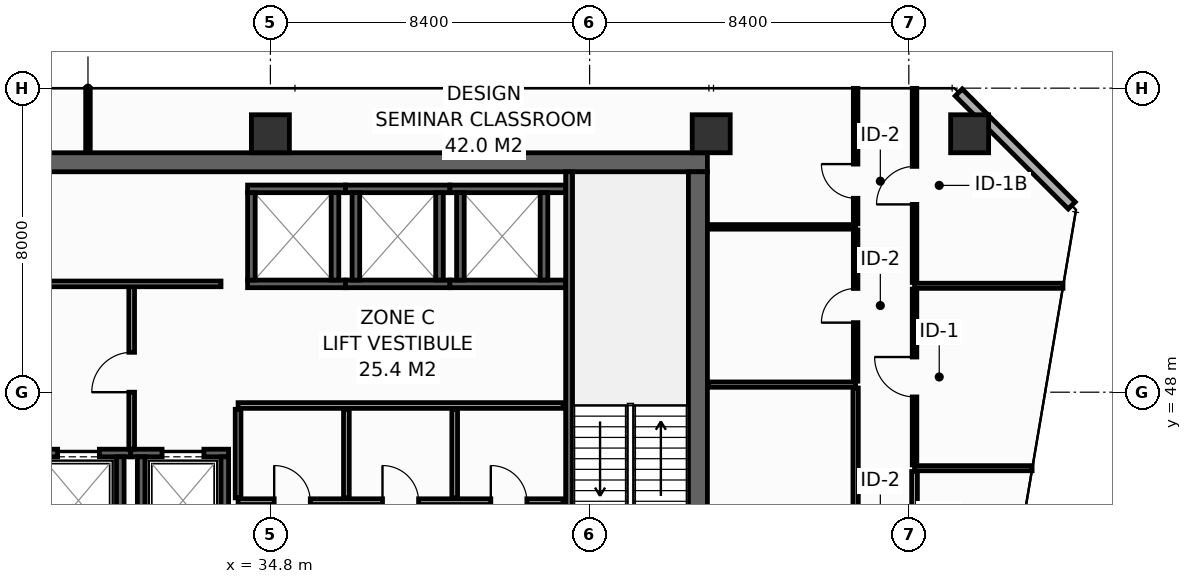
"""IFC4 building model, lengths in metres.
Left out: names, types, materials, properties, quantities, classifications, styles, units other than length and angle.
Written with IfcOpenShell. Run it as: python <this file> out.ifc"""

import sys

from ifc_helpers import new_model, si_unit, direction, frame, frame_2d, origin, origin_2d, place, context, subcontext, project, spatial, rectangle, hollow_rectangle, extrude, element, fill, save


model = new_model("IFC4")
c1 = context("Model", 3, precision=1e-05, world=origin(), true_north=direction((0.0, 1.0)))
c2 = subcontext(c1, "Body", "Model", "MODEL_VIEW")
j1 = project(units=[si_unit("LENGTHUNIT", "METRE"), si_unit("PLANEANGLEUNIT", "RADIAN")], contexts=[c1])
p1 = place(None, origin())
s1 = spatial("IfcSite", under=j1, at=p1, CompositionType="ELEMENT")
p2 = place(p1, origin())
s2 = spatial("IfcBuilding", under=s1, at=p2, CompositionType="ELEMENT")
p3 = place(p2, frame((0.0, 0.0, 175.2)))
s3 = spatial("IfcBuildingStorey", under=s2, at=p3, CompositionType="ELEMENT", Elevation=175.2)
p4 = place(p3, frame((13.6, 54.05, 0.0), z_axis=(0.0, 0.0, 1.0), x_axis=(1.0, 0.0, 0.0)))
e1 = element("IfcWall", 1, at=p4, inside=s3, PredefinedType="SHEAR", context=c2, shape_type="SweptSolid", body=[
    extrude(rectangle(XDim=32.7, YDim=0.5, at=frame_2d((16.35, 0.0))), origin(), (0.0, 0.0, 1.0), 3.55),
])
p5 = place(p3, frame((46.05, 43.4, 0.0), z_axis=(0.0, 0.0, 1.0), x_axis=(0.0, 1.0, 0.0)))
e2 = element("IfcWall", 2, at=p5, inside=s3, PredefinedType="SHEAR", context=c2, shape_type="SweptSolid", body=[
    extrude(rectangle(XDim=10.4, YDim=0.5, at=frame_2d((5.2, 0.0))), origin(), (0.0, 0.0, 1.0), 3.55),
])
for number, where, z_axis, x_axis in (
    (3, (34.8, 54.8, 0.0), (0.0, 0.0, 1.0), (1.0, 0.0, 0.0)),
    (4, (46.4, 54.8, 0.0), (0.0, 0.0, 1.0), (1.0, 0.0, 0.0)),
    (5, (53.2, 54.8, 0.0), (0.0, 0.0, 1.0), (1.0, 0.0, 0.0)),
):
    element("IfcColumn", number, at=place(p3, frame(where, z_axis=z_axis, x_axis=x_axis)), inside=s3, PredefinedType="COLUMN", context=c2, shape_type="SweptSolid", body=[
        extrude(hollow_rectangle(XDim=1.0, YDim=1.0, WallThickness=0.045, at=origin_2d()), origin(), (0.0, 0.0, 1.0), 3.8),
    ])
p6 = place(p3, frame((28.375, 46.4, 0.0), z_axis=(0.0, 0.0, 1.0), x_axis=(1.0, 0.0, 0.0)))
e6 = element("IfcWall", 6, at=p6, inside=s3, PredefinedType="SHEAR", context=c2, shape_type="SweptSolid", body=[
    extrude(rectangle(XDim=2.75, YDim=0.2, at=frame_2d((1.375, 0.0))), origin(), (0.0, 0.0, 1.0), 3.55),
])
p7 = place(p6, frame((0.825, 0.0, 0.0)))
e7 = element("IfcOpeningElement", 7, at=p7, cuts=e6, PredefinedType="OPENING", context=c2, shape_type="SweptSolid", body=[
    extrude(rectangle(XDim=1.1, YDim=2.2, at=frame_2d((0.55, 1.1))), frame((0.0, 0.11, 0.0), z_axis=(0.0, -1.0, 0.0), x_axis=(1.0, 0.0, 0.0)), (0.0, 0.0, 1.0), 0.22),
])
p8 = place(p3, frame((30.85, 44.0, 0.0), z_axis=(0.0, 0.0, 1.0), x_axis=(0.0, 1.0, 0.0)))
e8 = element("IfcWall", 8, at=p8, inside=s3, PredefinedType="SHEAR", context=c2, shape_type="SweptSolid", body=[
    extrude(rectangle(XDim=2.3, YDim=0.2, at=frame_2d((1.15, 0.0))), origin(), (0.0, 0.0, 1.0), 3.55),
])
p9 = place(p3, frame((31.125, 46.4, 0.0), z_axis=(0.0, 0.0, 1.0), x_axis=(1.0, 0.0, 0.0)))
e9 = element("IfcWall", 9, at=p9, inside=s3, PredefinedType="SHEAR", context=c2, shape_type="SweptSolid", body=[
    extrude(rectangle(XDim=2.575, YDim=0.2, at=frame_2d((1.288, 0.0))), origin(), (0.0, 0.0, 1.0), 3.55),
])
p10 = place(p9, frame((0.825, 0.0, 0.0)))
e10 = element("IfcOpeningElement", 10, at=p10, cuts=e9, PredefinedType="OPENING", context=c2, shape_type="SweptSolid", body=[
    extrude(rectangle(XDim=1.1, YDim=2.2, at=frame_2d((0.55, 1.1))), frame((0.0, 0.11, 0.0), z_axis=(0.0, -1.0, 0.0), x_axis=(1.0, 0.0, 0.0)), (0.0, 0.0, 1.0), 0.22),
])
for number, where, z_axis, x_axis in (
    (11, (31.4, 44.0, 0.0), (0.0, 0.0, 1.0), (0.0, 1.0, 0.0)),
    (12, (33.6, 44.0, 0.0), (0.0, 0.0, 1.0), (0.0, 1.0, 0.0)),
):
    element("IfcWall", number, at=place(p3, frame(where, z_axis=z_axis, x_axis=x_axis)), inside=s3, PredefinedType="SHEAR", context=c2, shape_type="SweptSolid", body=[
        extrude(rectangle(XDim=2.3, YDim=0.2, at=frame_2d((1.15, 0.0))), origin(), (0.0, 0.0, 1.0), 3.55),
    ])
for number, where, z_axis, x_axis in (
    (13, (34.2, 50.85, 0.0), (0.0, 0.0, 1.0), (1.0, 0.0, 0.0)),
    (14, (34.2, 53.35, 0.0), (0.0, 0.0, 1.0), (1.0, 0.0, 0.0)),
):
    element("IfcWall", number, at=place(p3, frame(where, z_axis=z_axis, x_axis=x_axis)), inside=s3, PredefinedType="SHEAR", context=c2, shape_type="SweptSolid", body=[
        extrude(rectangle(XDim=2.575, YDim=0.2, at=frame_2d((1.288, 0.0))), origin(), (0.0, 0.0, 1.0), 3.55),
    ])
for number, where, z_axis, x_axis in (
    (15, (34.3, 50.95, 0.0), (0.0, 0.0, 1.0), (0.0, 1.0, 0.0)),
    (16, (36.5, 50.95, 0.0), (0.0, 0.0, 1.0), (0.0, 1.0, 0.0)),
):
    element("IfcWall", number, at=place(p3, frame(where, z_axis=z_axis, x_axis=x_axis)), inside=s3, PredefinedType="SHEAR", context=c2, shape_type="SweptSolid", body=[
        extrude(rectangle(XDim=2.3, YDim=0.2, at=frame_2d((1.15, 0.0))), origin(), (0.0, 0.0, 1.0), 3.55),
    ])
for number, where, z_axis, x_axis in (
    (17, (36.775, 50.85, 0.0), (0.0, 0.0, 1.0), (1.0, 0.0, 0.0)),
    (18, (36.775, 53.35, 0.0), (0.0, 0.0, 1.0), (1.0, 0.0, 0.0)),
):
    element("IfcWall", number, at=place(p3, frame(where, z_axis=z_axis, x_axis=x_axis)), inside=s3, PredefinedType="SHEAR", context=c2, shape_type="SweptSolid", body=[
        extrude(rectangle(XDim=2.75, YDim=0.2, at=frame_2d((1.375, 0.0))), origin(), (0.0, 0.0, 1.0), 3.55),
    ])
for number, where, z_axis, x_axis in (
    (19, (37.05, 50.95, 0.0), (0.0, 0.0, 1.0), (0.0, 1.0, 0.0)),
    (20, (39.25, 50.95, 0.0), (0.0, 0.0, 1.0), (0.0, 1.0, 0.0)),
):
    element("IfcWall", number, at=place(p3, frame(where, z_axis=z_axis, x_axis=x_axis)), inside=s3, PredefinedType="SHEAR", context=c2, shape_type="SweptSolid", body=[
        extrude(rectangle(XDim=2.3, YDim=0.2, at=frame_2d((1.15, 0.0))), origin(), (0.0, 0.0, 1.0), 3.55),
    ])
for number, where, z_axis, x_axis in (
    (21, (39.525, 50.85, 0.0), (0.0, 0.0, 1.0), (1.0, 0.0, 0.0)),
    (22, (39.525, 53.35, 0.0), (0.0, 0.0, 1.0), (1.0, 0.0, 0.0)),
):
    element("IfcWall", number, at=place(p3, frame(where, z_axis=z_axis, x_axis=x_axis)), inside=s3, PredefinedType="SHEAR", context=c2, shape_type="SweptSolid", body=[
        extrude(rectangle(XDim=3.045, YDim=0.2, at=frame_2d((1.522, 0.0))), origin(), (0.0, 0.0, 1.0), 3.55),
    ])
for number, where, z_axis, x_axis in (
    (23, (39.8, 50.95, 0.0), (0.0, 0.0, 1.0), (0.0, 1.0, 0.0)),
    (24, (42.0, 50.95, 0.0), (0.0, 0.0, 1.0), (0.0, 1.0, 0.0)),
):
    element("IfcWall", number, at=place(p3, frame(where, z_axis=z_axis, x_axis=x_axis)), inside=s3, PredefinedType="SHEAR", context=c2, shape_type="SweptSolid", body=[
        extrude(rectangle(XDim=2.3, YDim=0.2, at=frame_2d((1.15, 0.0))), origin(), (0.0, 0.0, 1.0), 3.55),
    ])
p11 = place(p3, frame((42.66, 53.8, 0.0), z_axis=(0.0, 0.0, 1.0), x_axis=(0.0, -1.0, 0.0)))
e25 = element("IfcWall", 25, at=p11, inside=s3, PredefinedType="SHEAR", context=c2, shape_type="SweptSolid", body=[
    extrude(rectangle(XDim=10.4, YDim=0.18, at=frame_2d((5.2, 0.0))), origin(), (0.0, 0.0, 1.0), 3.55),
])
p12 = place(p11, frame((8.99, 0.0, 0.0)))
e26 = element("IfcOpeningElement", 26, at=p12, cuts=e25, PredefinedType="OPENING", context=c2, shape_type="SweptSolid", body=[
    extrude(rectangle(XDim=1.1, YDim=2.15, at=frame_2d((0.55, 1.075))), frame((0.0, 0.1, 0.0), z_axis=(0.0, -1.0, 0.0), x_axis=(1.0, 0.0, 0.0)), (0.0, 0.0, 1.0), 0.2),
])
p13 = place(p3, frame((31.15, 46.5, 0.0), z_axis=(0.0, 0.0, 1.0), x_axis=(0.0, 1.0, 0.0)))
e27 = element("IfcWall", 27, at=p13, inside=s3, PredefinedType="PARTITIONING", context=c2, shape_type="SweptSolid", body=[
    extrude(rectangle(XDim=4.35, YDim=0.15, at=frame_2d((2.175, 0.0))), origin(), (0.0, 0.0, 1.0), 3.55),
])
p14 = place(p13, frame((1.5, 0.0, 0.0)))
e28 = element("IfcOpeningElement", 28, at=p14, cuts=e27, PredefinedType="OPENING", context=c2, shape_type="SweptSolid", body=[
    extrude(rectangle(XDim=1.05, YDim=2.15, at=frame_2d((0.525, 1.075))), frame((0.0, 0.085, 0.0), z_axis=(0.0, -1.0, 0.0), x_axis=(1.0, 0.0, 0.0)), (0.0, 0.0, 1.0), 0.17),
])
p15 = place(p3, frame((33.95, 45.12, 0.0), z_axis=(0.0, 0.0, 1.0), x_axis=(1.0, 0.0, 0.0)))
e29 = element("IfcWall", 29, at=p15, inside=s3, PredefinedType="PARTITIONING", context=c2, shape_type="SweptSolid", body=[
    extrude(rectangle(XDim=8.55, YDim=0.15, at=frame_2d((4.275, 0.0))), origin(), (0.0, 0.0, 1.0), 3.55),
])
p16 = place(p15, frame((0.95, 0.0, 0.0)))
e30 = element("IfcOpeningElement", 30, at=p16, cuts=e29, PredefinedType="OPENING", context=c2, shape_type="SweptSolid", body=[
    extrude(rectangle(XDim=0.95, YDim=2.15, at=frame_2d((0.475, 1.075))), frame((0.0, 0.085, 0.0), z_axis=(0.0, -1.0, 0.0), x_axis=(1.0, 0.0, 0.0)), (0.0, 0.0, 1.0), 0.17),
])
p17 = place(p15, frame((3.8, 0.0, 0.0)))
e31 = element("IfcOpeningElement", 31, at=p17, cuts=e29, PredefinedType="OPENING", context=c2, shape_type="SweptSolid", body=[
    extrude(rectangle(XDim=0.95, YDim=2.15, at=frame_2d((0.475, 1.075))), frame((0.0, 0.085, 0.0), z_axis=(0.0, -1.0, 0.0), x_axis=(1.0, 0.0, 0.0)), (0.0, 0.0, 1.0), 0.17),
])
p18 = place(p15, frame((6.65, 0.0, 0.0)))
e32 = element("IfcOpeningElement", 32, at=p18, cuts=e29, PredefinedType="OPENING", context=c2, shape_type="SweptSolid", body=[
    extrude(rectangle(XDim=0.95, YDim=2.15, at=frame_2d((0.475, 1.075))), frame((0.0, 0.085, 0.0), z_axis=(0.0, -1.0, 0.0), x_axis=(1.0, 0.0, 0.0)), (0.0, 0.0, 1.0), 0.17),
])
p19 = place(p3, frame((33.95, 47.65, 0.0), z_axis=(0.0, 0.0, 1.0), x_axis=(1.0, 0.0, 0.0)))
e33 = element("IfcWall", 33, at=p19, inside=s3, PredefinedType="PARTITIONING", context=c2, shape_type="SweptSolid", body=[
    extrude(rectangle(XDim=8.55, YDim=0.15, at=frame_2d((4.275, 0.0))), origin(), (0.0, 0.0, 1.0), 3.55),
])
for number, where, z_axis, x_axis in (
    (34, (33.95, 45.22, 0.0), (0.0, 0.0, 1.0), (0.0, 1.0, 0.0)),
    (35, (36.8, 45.22, 0.0), (0.0, 0.0, 1.0), (0.0, 1.0, 0.0)),
    (36, (39.65, 45.22, 0.0), (0.0, 0.0, 1.0), (0.0, 1.0, 0.0)),
):
    element("IfcWall", number, at=place(p3, frame(where, z_axis=z_axis, x_axis=x_axis)), inside=s3, PredefinedType="PARTITIONING", context=c2, shape_type="SweptSolid", body=[
        extrude(rectangle(XDim=2.33, YDim=0.15, at=frame_2d((1.165, 0.0))), origin(), (0.0, 0.0, 1.0), 3.55),
    ])
p20 = place(p3, frame((25.85, 50.85, 0.0), z_axis=(0.0, 0.0, 1.0), x_axis=(1.0, 0.0, 0.0)))
e37 = element("IfcWall", 37, at=p20, inside=s3, PredefinedType="PARTITIONING", context=c2, shape_type="SweptSolid", body=[
    extrude(rectangle(XDim=7.65, YDim=0.15, at=frame_2d((3.825, 0.0))), origin(), (0.0, 0.0, 1.0), 3.55),
])
p21 = place(p20, frame((1.25, 0.0, 0.0)))
e38 = element("IfcOpeningElement", 38, at=p21, cuts=e37, PredefinedType="OPENING", context=c2, shape_type="SweptSolid", body=[
    extrude(rectangle(XDim=0.95, YDim=2.15, at=frame_2d((0.475, 1.075))), frame((0.0, 0.085, 0.0), z_axis=(0.0, -1.0, 0.0), x_axis=(1.0, 0.0, 0.0)), (0.0, 0.0, 1.0), 0.17),
])
p22 = place(p3, frame((55.887, 52.913, 0.0), z_axis=(0.0, 0.0, 1.0), x_axis=(-0.707106781187, 0.707106781187, 0.0)))
e39 = element("IfcWall", 39, at=p22, inside=s3, PredefinedType="STANDARD", context=c2, shape_type="SweptSolid", body=[
    extrude(rectangle(XDim=4.206, YDim=0.26, at=frame_2d((2.103, 0.0))), origin(), (0.0, 0.0, 1.0), 3.55),
])
p23 = place(p3, frame((46.32, 48.2, 0.0), z_axis=(0.0, 0.0, 1.0), x_axis=(1.0, 0.0, 0.0)))
e40 = element("IfcWall", 40, at=p23, inside=s3, PredefinedType="PARTITIONING", context=c2, shape_type="SweptSolid", body=[
    extrude(rectangle(XDim=3.88, YDim=0.14, at=frame_2d((1.94, 0.0))), origin(), (0.0, 0.0, 1.0), 3.55),
])
p24 = place(p3, frame((50.2, 40.84, 0.0), z_axis=(0.0, 0.0, 1.0), x_axis=(0.0, 1.0, 0.0)))
e41 = element("IfcWall", 41, at=p24, inside=s3, PredefinedType="PARTITIONING", context=c2, shape_type="SweptSolid", body=[
    extrude(rectangle(XDim=7.27, YDim=0.14, at=frame_2d((3.635, 0.0))), origin(), (0.0, 0.0, 1.0), 2.835),
])
p25 = place(p24, frame((3.185, 0.0, 0.0)))
e42 = element("IfcOpeningElement", 42, at=p25, cuts=e41, PredefinedType="OPENING", context=c2, shape_type="SweptSolid", body=[
    extrude(rectangle(XDim=0.9, YDim=2.1, at=frame_2d((0.45, 1.05))), frame((0.0, 0.08, 0.0), z_axis=(0.0, -1.0, 0.0), x_axis=(1.0, 0.0, 0.0)), (0.0, 0.0, 1.0), 0.16),
])
p26 = place(p3, frame((46.32, 52.35, 0.0), z_axis=(0.0, 0.0, 1.0), x_axis=(1.0, 0.0, 0.0)))
e43 = element("IfcWall", 43, at=p26, inside=s3, PredefinedType="PARTITIONING", context=c2, shape_type="SweptSolid", body=[
    extrude(rectangle(XDim=3.88, YDim=0.12, at=frame_2d((1.94, 0.0))), origin(), (0.0, 0.0, 1.0), 3.55),
])
p27 = place(p3, frame((30.0, 54.32, 0.0), z_axis=(0.0, 0.0, 1.0), x_axis=(0.0, 1.0, 0.0)))
e44 = element("IfcWall", 44, at=p27, inside=s3, PredefinedType="PARTITIONING", context=c2, shape_type="SweptSolid", body=[
    extrude(rectangle(XDim=1.675, YDim=0.12, at=frame_2d((0.837, 0.0))), origin(), (0.0, 0.0, 1.0), 2.935),
])
p28 = place(p3, frame((50.2, 48.29, 0.0), z_axis=(0.0, 0.0, 1.0), x_axis=(0.0, 1.0, 0.0)))
e45 = element("IfcWall", 45, at=p28, inside=s3, PredefinedType="PARTITIONING", context=c2, shape_type="SweptSolid", body=[
    extrude(rectangle(XDim=3.98, YDim=0.12, at=frame_2d((1.99, 0.0))), origin(), (0.0, 0.0, 1.0), 3.55),
])
p29 = place(p28, frame((1.54, 0.0, 0.0)))
e46 = element("IfcOpeningElement", 46, at=p29, cuts=e45, PredefinedType="OPENING", context=c2, shape_type="SweptSolid", body=[
    extrude(rectangle(XDim=0.9, YDim=2.1, at=frame_2d((0.45, 1.05))), frame((0.0, 0.07, 0.0), z_axis=(0.0, -1.0, 0.0), x_axis=(1.0, 0.0, 0.0)), (0.0, 0.0, 1.0), 0.14),
])
p30 = place(p3, frame((50.2, 52.43, 0.0), z_axis=(0.0, 0.0, 1.0), x_axis=(0.0, 1.0, 0.0)))
e47 = element("IfcWall", 47, at=p30, inside=s3, PredefinedType="PARTITIONING", context=c2, shape_type="SweptSolid", body=[
    extrude(rectangle(XDim=3.565, YDim=0.12, at=frame_2d((1.783, 0.0))), origin(), (0.0, 0.0, 1.0), 2.935),
])
p31 = place(p30, frame((0.672, 0.0, 0.0)))
e48 = element("IfcOpeningElement", 48, at=p31, cuts=e47, PredefinedType="OPENING", context=c2, shape_type="SweptSolid", body=[
    extrude(rectangle(XDim=0.9, YDim=2.1, at=frame_2d((0.45, 1.05))), frame((0.0, 0.07, 0.0), z_axis=(0.0, -1.0, 0.0), x_axis=(1.0, 0.0, 0.0)), (0.0, 0.0, 1.0), 0.14),
])
p32 = place(p3, frame((51.75, 46.0, 0.0), z_axis=(0.0, 0.0, 1.0), x_axis=(1.0, 0.0, 0.0)))
e49 = element("IfcWall", 49, at=p32, inside=s3, PredefinedType="PARTITIONING", context=c2, shape_type="SweptSolid", body=[
    extrude(rectangle(XDim=3.094, YDim=0.135, at=frame_2d((1.547, 0.0))), origin(), (0.0, 0.0, 1.0), 2.835),
])
p33 = place(p3, frame((51.75, 50.8, 0.0), z_axis=(0.0, 0.0, 1.0), x_axis=(1.0, 0.0, 0.0)))
e50 = element("IfcWall", 50, at=p33, inside=s3, PredefinedType="PARTITIONING", context=c2, shape_type="SweptSolid", body=[
    extrude(rectangle(XDim=3.906, YDim=0.135, at=frame_2d((1.953, 0.0))), origin(), (0.0, 0.0, 1.0), 2.835),
])
p34 = place(p3, frame((51.75, 40.837, 0.0), z_axis=(0.0, 0.0, 1.0), x_axis=(0.0, 1.0, 0.0)))
e51 = element("IfcWall", 51, at=p34, inside=s3, PredefinedType="PARTITIONING", context=c2, shape_type="SweptSolid", body=[
    extrude(rectangle(XDim=5.075, YDim=0.15, at=frame_2d((2.538, 0.0))), origin(), (0.0, 0.0, 1.0), 2.835),
])
p35 = place(p34, frame((2.233, 0.0, 0.0)))
e52 = element("IfcOpeningElement", 52, at=p35, cuts=e51, PredefinedType="OPENING", context=c2, shape_type="SweptSolid", body=[
    extrude(rectangle(XDim=1.05, YDim=2.15, at=frame_2d((0.525, 1.075))), frame((0.0, 0.085, 0.0), z_axis=(0.0, -1.0, 0.0), x_axis=(1.0, 0.0, 0.0)), (0.0, 0.0, 1.0), 0.17),
])
p36 = place(p3, frame((51.75, 46.087, 0.0), z_axis=(0.0, 0.0, 1.0), x_axis=(0.0, 1.0, 0.0)))
e53 = element("IfcWall", 53, at=p36, inside=s3, PredefinedType="PARTITIONING", context=c2, shape_type="SweptSolid", body=[
    extrude(rectangle(XDim=4.625, YDim=0.12, at=frame_2d((2.312, 0.0))), origin(), (0.0, 0.0, 1.0), 3.55),
])
p37 = place(p36, frame((1.788, 0.0, 0.0)))
e54 = element("IfcOpeningElement", 54, at=p37, cuts=e53, PredefinedType="OPENING", context=c2, shape_type="SweptSolid", body=[
    extrude(rectangle(XDim=1.05, YDim=2.15, at=frame_2d((0.525, 1.075))), frame((0.0, 0.07, 0.0), z_axis=(0.0, -1.0, 0.0), x_axis=(1.0, 0.0, 0.0)), (0.0, 0.0, 1.0), 0.14),
])
p38 = place(p3, frame((51.75, 50.887, 0.0), z_axis=(0.0, 0.0, 1.0), x_axis=(0.0, 1.0, 0.0)))
e55 = element("IfcWall", 55, at=p38, inside=s3, PredefinedType="PARTITIONING", context=c2, shape_type="SweptSolid", body=[
    extrude(rectangle(XDim=5.108, YDim=0.12, at=frame_2d((2.554, 0.0))), origin(), (0.0, 0.0, 1.0), 2.935),
])
p39 = place(p38, frame((2.054, 0.0, 0.0)))
e56 = element("IfcOpeningElement", 56, at=p39, cuts=e55, PredefinedType="OPENING", context=c2, shape_type="SweptSolid", body=[
    extrude(rectangle(XDim=1.0, YDim=2.15, at=frame_2d((0.5, 1.075))), frame((0.0, 0.07, 0.0), z_axis=(0.0, -1.0, 0.0), x_axis=(1.0, 0.0, 0.0)), (0.0, 0.0, 1.0), 0.14),
])
p40 = place(p7, origin())
e57 = element("IfcDoor", 57, at=p40, inside=s3, OperationType="SLIDING_TO_LEFT", PredefinedType="DOOR", context=c2, shape_type="SweptSolid", body=[
    extrude(rectangle(XDim=1.1, YDim=2.2, at=frame_2d((0.55, 1.1))), frame((0.0, 0.025, 0.0), z_axis=(0.0, -1.0, 0.0), x_axis=(1.0, 0.0, 0.0)), (0.0, 0.0, 1.0), 0.05),
])
fill(e7, e57)
p41 = place(p10, origin())
e58 = element("IfcDoor", 58, at=p41, inside=s3, OperationType="SLIDING_TO_LEFT", PredefinedType="DOOR", context=c2, shape_type="SweptSolid", body=[
    extrude(rectangle(XDim=1.1, YDim=2.2, at=frame_2d((0.55, 1.1))), frame((0.0, 0.025, 0.0), z_axis=(0.0, -1.0, 0.0), x_axis=(1.0, 0.0, 0.0)), (0.0, 0.0, 1.0), 0.05),
])
fill(e10, e58)
p42 = place(p14, origin())
e59 = element("IfcDoor", 59, at=p42, inside=s3, OperationType="SINGLE_SWING_LEFT", PredefinedType="DOOR", context=c2, shape_type="SweptSolid", body=[
    extrude(rectangle(XDim=1.05, YDim=2.15, at=frame_2d((0.525, 1.075))), frame((0.0, 0.025, 0.0), z_axis=(0.0, -1.0, 0.0), x_axis=(1.0, 0.0, 0.0)), (0.0, 0.0, 1.0), 0.05),
])
fill(e28, e59)
p43 = place(p16, origin())
e60 = element("IfcDoor", 60, at=p43, inside=s3, OperationType="SINGLE_SWING_LEFT", PredefinedType="DOOR", context=c2, shape_type="SweptSolid", body=[
    extrude(rectangle(XDim=0.95, YDim=2.15, at=frame_2d((0.475, 1.075))), frame((0.0, 0.025, 0.0), z_axis=(0.0, -1.0, 0.0), x_axis=(1.0, 0.0, 0.0)), (0.0, 0.0, 1.0), 0.05),
])
fill(e30, e60)
p44 = place(p17, origin())
e61 = element("IfcDoor", 61, at=p44, inside=s3, OperationType="SINGLE_SWING_LEFT", PredefinedType="DOOR", context=c2, shape_type="SweptSolid", body=[
    extrude(rectangle(XDim=0.95, YDim=2.15, at=frame_2d((0.475, 1.075))), frame((0.0, 0.025, 0.0), z_axis=(0.0, -1.0, 0.0), x_axis=(1.0, 0.0, 0.0)), (0.0, 0.0, 1.0), 0.05),
])
fill(e31, e61)
p45 = place(p18, origin())
e62 = element("IfcDoor", 62, at=p45, inside=s3, OperationType="SINGLE_SWING_LEFT", PredefinedType="DOOR", context=c2, shape_type="SweptSolid", body=[
    extrude(rectangle(XDim=0.95, YDim=2.15, at=frame_2d((0.475, 1.075))), frame((0.0, 0.025, 0.0), z_axis=(0.0, -1.0, 0.0), x_axis=(1.0, 0.0, 0.0)), (0.0, 0.0, 1.0), 0.05),
])
fill(e32, e62)
p46 = place(p29, origin())
e63 = element("IfcDoor", 63, at=p46, inside=s3, OperationType="SINGLE_SWING_LEFT", PredefinedType="DOOR", context=c2, shape_type="SweptSolid", body=[
    extrude(rectangle(XDim=0.9, YDim=2.1, at=frame_2d((0.45, 1.05))), frame((0.0, 0.025, 0.0), z_axis=(0.0, -1.0, 0.0), x_axis=(1.0, 0.0, 0.0)), (0.0, 0.0, 1.0), 0.05),
])
fill(e46, e63)
p47 = place(p31, origin())
e64 = element("IfcDoor", 64, at=p47, inside=s3, OperationType="SINGLE_SWING_RIGHT", PredefinedType="DOOR", context=c2, shape_type="SweptSolid", body=[
    extrude(rectangle(XDim=0.9, YDim=2.1, at=frame_2d((0.45, 1.05))), frame((0.0, 0.025, 0.0), z_axis=(0.0, -1.0, 0.0), x_axis=(1.0, 0.0, 0.0)), (0.0, 0.0, 1.0), 0.05),
])
fill(e48, e64)
p48 = place(p37, origin())
e65 = element("IfcDoor", 65, at=p48, inside=s3, OperationType="SINGLE_SWING_RIGHT", PredefinedType="DOOR", context=c2, shape_type="SweptSolid", body=[
    extrude(rectangle(XDim=1.05, YDim=2.15, at=frame_2d((0.525, 1.075))), frame((0.0, 0.025, 0.0), z_axis=(0.0, -1.0, 0.0), x_axis=(1.0, 0.0, 0.0)), (0.0, 0.0, 1.0), 0.05),
])
fill(e54, e65)
p49 = place(p39, origin())
e66 = element("IfcDoor", 66, at=p49, inside=s3, OperationType="SINGLE_SWING_LEFT", PredefinedType="DOOR", context=c2, shape_type="SweptSolid", body=[
    extrude(rectangle(XDim=1.0, YDim=2.15, at=frame_2d((0.5, 1.075))), frame((0.0, 0.025, 0.0), z_axis=(0.0, -1.0, 0.0), x_axis=(1.0, 0.0, 0.0)), (0.0, 0.0, 1.0), 0.05),
])
fill(e56, e66)
save(model, sys.argv[1])
